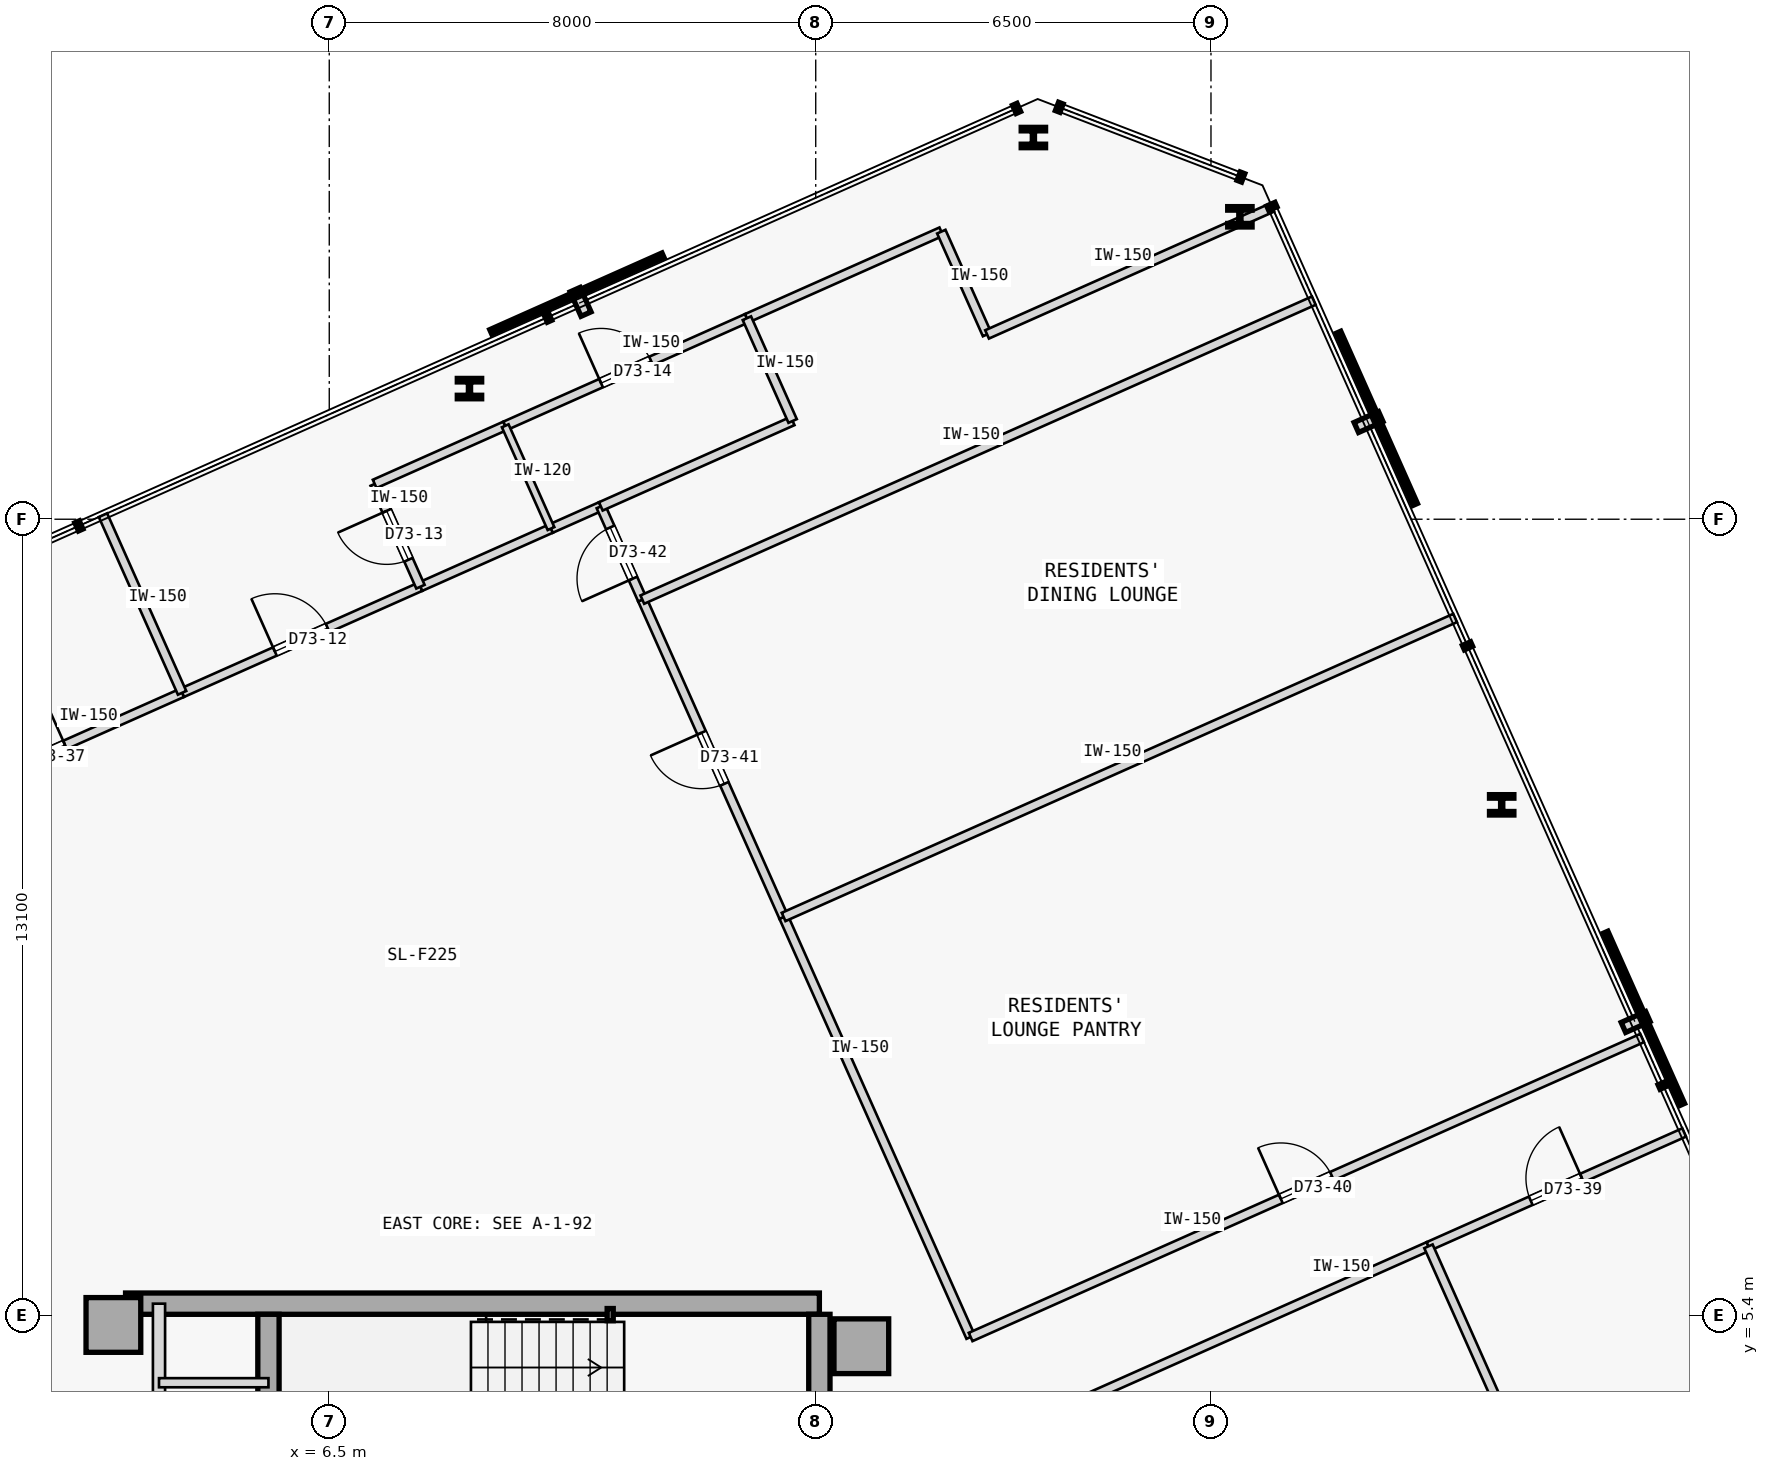
"""IFC4 building model, lengths in metres.
Left out: names, types, materials, properties, quantities, classifications, styles, units other than length and angle.
Written with IfcOpenShell. Run it as: python <this file> out.ifc"""

import sys

from ifc_helpers import new_model, si_unit, direction, frame, frame_2d, origin, origin_2d, place, context, subcontext, project, spatial, rectangle, hollow_rectangle, i_section, extrude, element, fill, save


model = new_model("IFC4")
c1 = context("Model", 3, precision=1e-05, world=origin(), true_north=direction((0.0, 1.0)))
c2 = subcontext(c1, "Body", "Model", "MODEL_VIEW")
j1 = project(units=[si_unit("LENGTHUNIT", "METRE"), si_unit("PLANEANGLEUNIT", "RADIAN")], contexts=[c1])
p1 = place(None, origin())
s1 = spatial("IfcSite", under=j1, at=p1, CompositionType="ELEMENT")
p2 = place(p1, origin())
s2 = spatial("IfcBuilding", under=s1, at=p2, CompositionType="ELEMENT")
p3 = place(p2, frame((0.0, 0.0, 272.25)))
s3 = spatial("IfcBuildingStorey", under=s2, at=p3, CompositionType="ELEMENT", Elevation=272.25)
for number, where, z_axis, x_axis in (
    (1, (15.25, 4.9, 0.0), (0.0, 0.0, 1.0), (1.0, 0.0, 0.0)),
    (2, (2.95, 5.25, 0.0), (0.0, 0.0, 1.0), (1.0, 0.0, 0.0)),
):
    element("IfcColumn", number, at=place(p3, frame(where, z_axis=z_axis, x_axis=x_axis)), inside=s3, PredefinedType="COLUMN", context=c2, shape_type="SweptSolid", body=[
        extrude(rectangle(XDim=0.9, YDim=0.9, at=origin_2d()), origin(), (0.0, 0.0, 1.0), 3.35),
    ])
p4 = place(p3, frame((3.15, 5.6, 0.0), z_axis=(0.0, 0.0, 1.0), x_axis=(1.0, 0.0, 0.0)))
e3 = element("IfcWall", 3, at=p4, inside=s3, PredefinedType="SHEAR", context=c2, shape_type="SweptSolid", body=[
    extrude(rectangle(XDim=11.41, YDim=0.35, at=frame_2d((5.705, 0.0))), origin(), (0.0, 0.0, 1.0), 3.1),
])
p5 = place(p3, frame((14.56, -5.425, 0.0), z_axis=(0.0, 0.0, 1.0), x_axis=(0.0, 1.0, 0.0)))
e4 = element("IfcWall", 4, at=p5, inside=s3, PredefinedType="SHEAR", context=c2, shape_type="SweptSolid", body=[
    extrude(rectangle(XDim=10.85, YDim=0.35, at=frame_2d((5.425, 0.0))), origin(), (0.0, 0.0, 1.0), 3.1),
])
p6 = place(p3, frame((5.5, 2.15, 0.0), z_axis=(0.0, 0.0, 1.0), x_axis=(0.0, 1.0, 0.0)))
e5 = element("IfcWall", 5, at=p6, inside=s3, PredefinedType="SHEAR", context=c2, shape_type="SweptSolid", body=[
    extrude(rectangle(XDim=3.275, YDim=0.35, at=frame_2d((1.638, 0.0))), origin(), (0.0, 0.0, 1.0), 3.1),
])
p7 = place(p3, frame((11.12, 5.42, 0.0), z_axis=(0.0, 0.0, 1.0), x_axis=(1.0, 0.0, 0.0)))
e6 = element("IfcColumn", 6, at=p7, inside=s3, PredefinedType="COLUMN", context=c2, shape_type="SweptSolid", body=[
    extrude(hollow_rectangle(XDim=0.1, YDim=0.2, WallThickness=0.008, at=origin_2d()), origin(), (0.0, 0.0, 1.0), 3.35),
])
for number, where, z_axis, x_axis in (
    (7, (25.781, 13.803, 0.0), (0.0, 0.0, 1.0), (1.0, 0.0, 0.0)),
    (8, (21.476, 23.473, 0.0), (0.0, 0.0, 1.0), (1.0, 0.0, 0.0)),
    (9, (18.08, 24.777, 0.0), (0.0, 0.0, 1.0), (1.0, 0.0, 0.0)),
    (10, (8.806, 20.648, 0.0), (0.0, 0.0, 1.0), (1.0, 0.0, 0.0)),
):
    element("IfcColumn", number, at=place(p3, frame(where, z_axis=z_axis, x_axis=x_axis)), inside=s3, PredefinedType="COLUMN", context=c2, shape_type="SweptSolid", body=[
        extrude(i_section(OverallWidth=0.401, OverallDepth=0.335, WebThickness=0.036, FlangeThickness=0.058, FilletRadius=0.015, at=origin_2d()), origin(), (0.0, 0.0, 1.0), 3.35),
    ])
p8 = place(p3, frame((3.7, -1.15, 0.0), z_axis=(0.0, 0.0, 1.0), x_axis=(0.0, 1.0, 0.0)))
e11 = element("IfcWall", 11, at=p8, inside=s3, PredefinedType="STANDARD", context=c2, shape_type="SweptSolid", body=[
    extrude(rectangle(XDim=6.75, YDim=0.2, at=frame_2d((3.375, 0.0))), origin(), (0.0, 0.0, 1.0), 3.1),
])
p9 = place(p8, frame((1.1, 0.0, 0.0)))
e12 = element("IfcOpeningElement", 12, at=p9, cuts=e11, PredefinedType="OPENING", context=c2, shape_type="SweptSolid", body=[
    extrude(rectangle(XDim=0.9, YDim=2.15, at=frame_2d((0.45, 1.075))), frame((0.0, 0.11, 0.0), z_axis=(0.0, -1.0, 0.0), x_axis=(1.0, 0.0, 0.0)), (0.0, 0.0, 1.0), 0.22),
])
p10 = place(p8, frame((4.0, 0.0, 0.0)))
e13 = element("IfcOpeningElement", 13, at=p10, cuts=e11, PredefinedType="OPENING", context=c2, shape_type="SweptSolid", body=[
    extrude(rectangle(XDim=0.92, YDim=2.15, at=frame_2d((0.46, 1.075))), frame((0.0, 0.11, 0.0), z_axis=(0.0, -1.0, 0.0), x_axis=(1.0, 0.0, 0.0)), (0.0, 0.0, 1.0), 0.22),
])
p11 = place(p3, frame((3.7, 4.3, 0.0), z_axis=(0.0, 0.0, 1.0), x_axis=(1.0, 0.0, 0.0)))
e14 = element("IfcWall", 14, at=p11, inside=s3, PredefinedType="PARTITIONING", context=c2, shape_type="SweptSolid", body=[
    extrude(rectangle(XDim=1.8, YDim=0.15, at=frame_2d((0.9, 0.0))), origin(), (0.0, 0.0, 1.0), 3.1),
])
p12 = place(p3, frame((4.08, 15.645, 0.0), z_axis=(0.0, 0.0, 1.0), x_axis=(0.913557968328, 0.406708542452, 0.0)))
e15 = element("IfcWall", 15, at=p12, inside=s3, PredefinedType="PARTITIONING", context=c2, shape_type="SweptSolid", body=[
    extrude(rectangle(XDim=4.291, YDim=0.15, at=frame_2d((2.146, 0.0))), origin(), (0.0, 0.0, 1.0), 3.1),
])
p13 = place(p12, frame((1.67, 0.0, 0.0)))
e16 = element("IfcOpeningElement", 16, at=p13, cuts=e15, PredefinedType="OPENING", context=c2, shape_type="SweptSolid", body=[
    extrude(rectangle(XDim=0.95, YDim=2.15, at=frame_2d((0.475, 1.075))), frame((0.0, 0.085, 0.0), z_axis=(0.0, -1.0, 0.0), x_axis=(1.0, 0.0, 0.0)), (0.0, 0.0, 1.0), 0.17),
])
p14 = place(p3, frame((8.0, 17.39, 0.0), z_axis=(0.0, 0.0, 1.0), x_axis=(0.913520021435, 0.406793768926, 0.0)))
e17 = element("IfcWall", 17, at=p14, inside=s3, PredefinedType="PARTITIONING", context=c2, shape_type="SweptSolid", body=[
    extrude(rectangle(XDim=2.35, YDim=0.15, at=frame_2d((1.175, 0.0))), origin(), (0.0, 0.0, 1.0), 3.1),
])
p15 = place(p3, frame((10.146, 18.346, 0.0), z_axis=(0.0, 0.0, 1.0), x_axis=(0.9135644188, 0.406694052946, 0.0)))
e18 = element("IfcWall", 18, at=p15, inside=s3, PredefinedType="PARTITIONING", context=c2, shape_type="SweptSolid", body=[
    extrude(rectangle(XDim=0.897, YDim=0.15, at=frame_2d((0.448, 0.0))), origin(), (0.0, 0.0, 1.0), 3.1),
])
p16 = place(p3, frame((-0.612, 13.557, 0.0), z_axis=(0.0, 0.0, 1.0), x_axis=(0.913546679905, 0.406733897819, 0.0)))
e19 = element("IfcWall", 19, at=p16, inside=s3, PredefinedType="PARTITIONING", context=c2, shape_type="SweptSolid", body=[
    extrude(rectangle(XDim=5.135, YDim=0.15, at=frame_2d((2.567, 0.0))), origin(), (0.0, 0.0, 1.0), 3.1),
])
p17 = place(p16, frame((2.107, 0.0, 0.0)))
e20 = element("IfcOpeningElement", 20, at=p17, cuts=e19, PredefinedType="OPENING", context=c2, shape_type="SweptSolid", body=[
    extrude(rectangle(XDim=0.92, YDim=2.15, at=frame_2d((0.46, 1.075))), frame((0.0, 0.085, 0.0), z_axis=(0.0, -1.0, 0.0), x_axis=(1.0, 0.0, 0.0)), (0.0, 0.0, 1.0), 0.17),
])
p18 = place(p3, frame((17.739, 3.499, 0.0), z_axis=(0.0, 0.0, 1.0), x_axis=(0.913545033673, 0.406737595326, 0.0)))
e21 = element("IfcWall", 21, at=p18, inside=s3, PredefinedType="PARTITIONING", context=c2, shape_type="SweptSolid", body=[
    extrude(rectangle(XDim=7.485, YDim=0.15, at=frame_2d((3.743, 0.0))), origin(), (0.0, 0.0, 1.0), 3.1),
])
p19 = place(p3, frame((24.577, 6.543, 0.0), z_axis=(0.0, 0.0, 1.0), x_axis=(0.913537946403, 0.406753513177, 0.0)))
e22 = element("IfcWall", 22, at=p19, inside=s3, PredefinedType="PARTITIONING", context=c2, shape_type="SweptSolid", body=[
    extrude(rectangle(XDim=4.603, YDim=0.15, at=frame_2d((2.302, 0.0))), origin(), (0.0, 0.0, 1.0), 3.1),
])
p20 = place(p19, frame((1.842, 0.0, 0.0)))
e23 = element("IfcOpeningElement", 23, at=p20, cuts=e22, PredefinedType="OPENING", context=c2, shape_type="SweptSolid", body=[
    extrude(rectangle(XDim=0.92, YDim=2.15, at=frame_2d((0.46, 1.075))), frame((0.0, 0.085, 0.0), z_axis=(0.0, -1.0, 0.0), x_axis=(1.0, 0.0, 0.0)), (0.0, 0.0, 1.0), 0.17),
])
p21 = place(p3, frame((17.047, 5.052, 0.0), z_axis=(0.0, 0.0, 1.0), x_axis=(-0.406752543172, 0.913538378298, 0.0)))
e24 = element("IfcWall", 24, at=p21, inside=s3, PredefinedType="PARTITIONING", context=c2, shape_type="SweptSolid", body=[
    extrude(rectangle(XDim=7.561, YDim=0.15, at=frame_2d((3.781, 0.0))), origin(), (0.0, 0.0, 1.0), 3.1),
])
p22 = place(p3, frame((17.047, 5.052, 0.0), z_axis=(0.0, 0.0, 1.0), x_axis=(0.913549839503, 0.406726801113, 0.0)))
e25 = element("IfcWall", 25, at=p22, inside=s3, PredefinedType="PARTITIONING", context=c2, shape_type="SweptSolid", body=[
    extrude(rectangle(XDim=12.088, YDim=0.15, at=frame_2d((6.044, 0.0))), origin(), (0.0, 0.0, 1.0), 3.1),
])
p23 = place(p22, frame((5.584, 0.0, 0.0)))
e26 = element("IfcOpeningElement", 26, at=p23, cuts=e25, PredefinedType="OPENING", context=c2, shape_type="SweptSolid", body=[
    extrude(rectangle(XDim=0.92, YDim=2.15, at=frame_2d((0.46, 1.075))), frame((0.0, 0.085, 0.0), z_axis=(0.0, -1.0, 0.0), x_axis=(1.0, 0.0, 0.0)), (0.0, 0.0, 1.0), 0.17),
])
p24 = place(p3, frame((13.972, 11.959, 0.0), z_axis=(0.0, 0.0, 1.0), x_axis=(-0.406713331746, 0.913555836159, 0.0)))
e27 = element("IfcWall", 27, at=p24, inside=s3, PredefinedType="PARTITIONING", context=c2, shape_type="SweptSolid", body=[
    extrude(rectangle(XDim=5.713, YDim=0.15, at=frame_2d((2.856, 0.0))), origin(), (0.0, 0.0, 1.0), 3.1),
])
p25 = place(p24, frame((2.396, 0.0, 0.0)))
e28 = element("IfcOpeningElement", 28, at=p25, cuts=e27, PredefinedType="OPENING", context=c2, shape_type="SweptSolid", body=[
    extrude(rectangle(XDim=0.92, YDim=2.15, at=frame_2d((0.46, 1.075))), frame((0.0, 0.085, 0.0), z_axis=(0.0, -1.0, 0.0), x_axis=(1.0, 0.0, 0.0)), (0.0, 0.0, 1.0), 0.17),
])
p26 = place(p3, frame((11.648, 17.178, 0.0), z_axis=(0.0, 0.0, 1.0), x_axis=(-0.406786313485, 0.913523341334, 0.0)))
e29 = element("IfcWall", 29, at=p26, inside=s3, PredefinedType="PARTITIONING", context=c2, shape_type="SweptSolid", body=[
    extrude(rectangle(XDim=1.678, YDim=0.15, at=frame_2d((0.839, 0.0))), origin(), (0.0, 0.0, 1.0), 3.1),
])
p27 = place(p26, frame((0.379, 0.0, 0.0)))
e30 = element("IfcOpeningElement", 30, at=p27, cuts=e29, PredefinedType="OPENING", context=c2, shape_type="SweptSolid", body=[
    extrude(rectangle(XDim=0.92, YDim=2.15, at=frame_2d((0.46, 1.075))), frame((0.0, 0.085, 0.0), z_axis=(0.0, -1.0, 0.0), x_axis=(1.0, 0.0, 0.0)), (0.0, 0.0, 1.0), 0.17),
])
p28 = place(p3, frame((8.0, 17.39, 0.0), z_axis=(0.0, 0.0, 1.0), x_axis=(-0.406701600856, 0.913561058639, 0.0)))
e31 = element("IfcWall", 31, at=p28, inside=s3, PredefinedType="PARTITIONING", context=c2, shape_type="SweptSolid", body=[
    extrude(rectangle(XDim=1.85, YDim=0.15, at=frame_2d((0.925, 0.0))), origin(), (0.0, 0.0, 1.0), 3.1),
])
p29 = place(p28, frame((0.485, 0.0, 0.0)))
e32 = element("IfcOpeningElement", 32, at=p29, cuts=e31, PredefinedType="OPENING", context=c2, shape_type="SweptSolid", body=[
    extrude(rectangle(XDim=0.88, YDim=2.15, at=frame_2d((0.44, 1.075))), frame((0.0, 0.085, 0.0), z_axis=(0.0, -1.0, 0.0), x_axis=(1.0, 0.0, 0.0)), (0.0, 0.0, 1.0), 0.17),
])
p30 = place(p3, frame((7.247, 19.081, 0.0), z_axis=(0.0, 0.0, 1.0), x_axis=(0.913541436194, 0.406745675276, 0.0)))
e33 = element("IfcWall", 33, at=p30, inside=s3, PredefinedType="PARTITIONING", context=c2, shape_type="SweptSolid", body=[
    extrude(rectangle(XDim=2.35, YDim=0.15, at=frame_2d((1.175, 0.0))), origin(), (0.0, 0.0, 1.0), 3.1),
])
p31 = place(p3, frame((9.394, 20.036, 0.0), z_axis=(0.0, 0.0, 1.0), x_axis=(0.913554477336, 0.406716383908, 0.0)))
e34 = element("IfcWall", 34, at=p31, inside=s3, PredefinedType="PARTITIONING", context=c2, shape_type="SweptSolid", body=[
    extrude(rectangle(XDim=4.35, YDim=0.15, at=frame_2d((2.175, 0.0))), origin(), (0.0, 0.0, 1.0), 3.1),
])
p32 = place(p31, frame((1.725, 0.0, 0.0)))
e35 = element("IfcOpeningElement", 35, at=p32, cuts=e34, PredefinedType="OPENING", context=c2, shape_type="SweptSolid", body=[
    extrude(rectangle(XDim=0.9, YDim=2.15, at=frame_2d((0.45, 1.075))), frame((0.0, 0.085, 0.0), z_axis=(0.0, -1.0, 0.0), x_axis=(1.0, 0.0, 0.0)), (0.0, 0.0, 1.0), 0.17),
])
p33 = place(p3, frame((4.08, 15.645, 0.0), z_axis=(0.0, 0.0, 1.0), x_axis=(-0.406761717745, 0.913534293268, 0.0)))
e36 = element("IfcWall", 36, at=p33, inside=s3, PredefinedType="PARTITIONING", context=c2, shape_type="SweptSolid", body=[
    extrude(rectangle(XDim=3.198, YDim=0.15, at=frame_2d((1.599, 0.0))), origin(), (0.0, 0.0, 1.0), 3.1),
])
p34 = place(p3, frame((13.368, 21.806, 0.0), z_axis=(0.0, 0.0, 1.0), x_axis=(0.913538066796, 0.406753242783, 0.0)))
e37 = element("IfcWall", 37, at=p34, inside=s3, PredefinedType="PARTITIONING", context=c2, shape_type="SweptSolid", body=[
    extrude(rectangle(XDim=3.5, YDim=0.15, at=frame_2d((1.75, 0.0))), origin(), (0.0, 0.0, 1.0), 3.1),
])
p35 = place(p3, frame((17.318, 21.539, 0.0), z_axis=(0.0, 0.0, 1.0), x_axis=(-0.406750635596, 0.913539227643, 0.0)))
e38 = element("IfcWall", 38, at=p35, inside=s3, PredefinedType="PARTITIONING", context=c2, shape_type="SweptSolid", body=[
    extrude(rectangle(XDim=1.85, YDim=0.15, at=frame_2d((0.925, 0.0))), origin(), (0.0, 0.0, 1.0), 3.1),
])
p36 = place(p3, frame((17.318, 21.539, 0.0), z_axis=(0.0, 0.0, 1.0), x_axis=(0.91356434511, 0.406694218479, 0.0)))
e39 = element("IfcWall", 39, at=p36, inside=s3, PredefinedType="PARTITIONING", context=c2, shape_type="SweptSolid", body=[
    extrude(rectangle(XDim=5.135, YDim=0.15, at=frame_2d((2.567, 0.0))), origin(), (0.0, 0.0, 1.0), 3.1),
])
p37 = place(p3, frame((10.146, 18.346, 0.0), z_axis=(0.0, 0.0, 1.0), x_axis=(-0.406860767979, 0.913490183571, 0.0)))
e40 = element("IfcWall", 40, at=p37, inside=s3, PredefinedType="PARTITIONING", context=c2, shape_type="SweptSolid", body=[
    extrude(rectangle(XDim=1.85, YDim=0.12, at=frame_2d((0.925, 0.0))), origin(), (0.0, 0.0, 1.0), 3.1),
])
p38 = place(p3, frame((10.966, 18.711, 0.0), z_axis=(0.0, 0.0, 1.0), x_axis=(0.913540199258, 0.406748453396, 0.0)))
e41 = element("IfcWall", 41, at=p38, inside=s3, PredefinedType="PARTITIONING", context=c2, shape_type="SweptSolid", body=[
    extrude(rectangle(XDim=3.453, YDim=0.15, at=frame_2d((1.727, 0.0))), origin(), (0.0, 0.0, 1.0), 3.1),
])
p39 = place(p3, frame((14.12, 20.116, 0.0), z_axis=(0.0, 0.0, 1.0), x_axis=(-0.406750635596, 0.913539227643, 0.0)))
e42 = element("IfcWall", 42, at=p39, inside=s3, PredefinedType="PARTITIONING", context=c2, shape_type="SweptSolid", body=[
    extrude(rectangle(XDim=1.85, YDim=0.15, at=frame_2d((0.925, 0.0))), origin(), (0.0, 0.0, 1.0), 3.1),
])
p40 = place(p3, frame((28.081, -1.327, 0.0), z_axis=(0.0, 0.0, 1.0), x_axis=(-0.406751025101, 0.913539054217, 0.0)))
e43 = element("IfcWall", 43, at=p40, inside=s3, PredefinedType="PARTITIONING", context=c2, shape_type="SweptSolid", body=[
    extrude(rectangle(XDim=8.615, YDim=0.15, at=frame_2d((4.308, 0.0))), origin(), (0.0, 0.0, 1.0), 3.1),
])
p41 = place(p3, frame((13.972, 11.959, 0.0), z_axis=(0.0, 0.0, 1.0), x_axis=(0.913549839503, 0.406726801113, 0.0)))
e44 = element("IfcWall", 44, at=p41, inside=s3, PredefinedType="PARTITIONING", context=c2, shape_type="SweptSolid", body=[
    extrude(rectangle(XDim=12.088, YDim=0.15, at=frame_2d((6.044, 0.0))), origin(), (0.0, 0.0, 1.0), 3.1),
])
p42 = place(p3, frame((11.648, 17.178, 0.0), z_axis=(0.0, 0.0, 1.0), x_axis=(0.913542334914, 0.406743656766, 0.0)))
e45 = element("IfcWall", 45, at=p42, inside=s3, PredefinedType="PARTITIONING", context=c2, shape_type="SweptSolid", body=[
    extrude(rectangle(XDim=12.088, YDim=0.15, at=frame_2d((6.044, 0.0))), origin(), (0.0, 0.0, 1.0), 3.1),
])
p43 = place(p13, origin())
e46 = element("IfcDoor", 46, at=p43, inside=s3, OperationType="SINGLE_SWING_LEFT", PredefinedType="DOOR", context=c2, shape_type="SweptSolid", body=[
    extrude(rectangle(XDim=0.95, YDim=2.15, at=frame_2d((0.475, 1.075))), frame((0.0, 0.025, 0.0), z_axis=(0.0, -1.0, 0.0), x_axis=(1.0, 0.0, 0.0)), (0.0, 0.0, 1.0), 0.05),
])
fill(e16, e46)
p44 = place(p29, origin())
e47 = element("IfcDoor", 47, at=p44, inside=s3, OperationType="SINGLE_SWING_RIGHT", PredefinedType="DOOR", context=c2, shape_type="SweptSolid", body=[
    extrude(rectangle(XDim=0.88, YDim=2.15, at=frame_2d((0.44, 1.075))), frame((0.0, 0.025, 0.0), z_axis=(0.0, -1.0, 0.0), x_axis=(1.0, 0.0, 0.0)), (0.0, 0.0, 1.0), 0.05),
])
fill(e32, e47)
p45 = place(p32, origin())
e48 = element("IfcDoor", 48, at=p45, inside=s3, OperationType="SINGLE_SWING_LEFT", PredefinedType="DOOR", context=c2, shape_type="SweptSolid", body=[
    extrude(rectangle(XDim=0.9, YDim=2.15, at=frame_2d((0.45, 1.075))), frame((0.0, 0.025, 0.0), z_axis=(0.0, -1.0, 0.0), x_axis=(1.0, 0.0, 0.0)), (0.0, 0.0, 1.0), 0.05),
])
fill(e35, e48)
p46 = place(p17, origin())
e49 = element("IfcDoor", 49, at=p46, inside=s3, OperationType="SINGLE_SWING_RIGHT", PredefinedType="DOOR", context=c2, shape_type="SweptSolid", body=[
    extrude(rectangle(XDim=0.92, YDim=2.15, at=frame_2d((0.46, 1.075))), frame((0.0, 0.025, 0.0), z_axis=(0.0, -1.0, 0.0), x_axis=(1.0, 0.0, 0.0)), (0.0, 0.0, 1.0), 0.05),
])
fill(e20, e49)
p47 = place(p20, origin())
e50 = element("IfcDoor", 50, at=p47, inside=s3, OperationType="SINGLE_SWING_RIGHT", PredefinedType="DOOR", context=c2, shape_type="SweptSolid", body=[
    extrude(rectangle(XDim=0.92, YDim=2.15, at=frame_2d((0.46, 1.075))), frame((0.0, 0.025, 0.0), z_axis=(0.0, -1.0, 0.0), x_axis=(1.0, 0.0, 0.0)), (0.0, 0.0, 1.0), 0.05),
])
fill(e23, e50)
p48 = place(p23, origin())
e51 = element("IfcDoor", 51, at=p48, inside=s3, OperationType="SINGLE_SWING_LEFT", PredefinedType="DOOR", context=c2, shape_type="SweptSolid", body=[
    extrude(rectangle(XDim=0.92, YDim=2.15, at=frame_2d((0.46, 1.075))), frame((0.0, 0.025, 0.0), z_axis=(0.0, -1.0, 0.0), x_axis=(1.0, 0.0, 0.0)), (0.0, 0.0, 1.0), 0.05),
])
fill(e26, e51)
p49 = place(p25, origin())
e52 = element("IfcDoor", 52, at=p49, inside=s3, OperationType="SINGLE_SWING_RIGHT", PredefinedType="DOOR", context=c2, shape_type="SweptSolid", body=[
    extrude(rectangle(XDim=0.92, YDim=2.15, at=frame_2d((0.46, 1.075))), frame((0.0, 0.025, 0.0), z_axis=(0.0, -1.0, 0.0), x_axis=(1.0, 0.0, 0.0)), (0.0, 0.0, 1.0), 0.05),
])
fill(e28, e52)
p50 = place(p27, origin())
e53 = element("IfcDoor", 53, at=p50, inside=s3, OperationType="SINGLE_SWING_LEFT", PredefinedType="DOOR", context=c2, shape_type="SweptSolid", body=[
    extrude(rectangle(XDim=0.92, YDim=2.15, at=frame_2d((0.46, 1.075))), frame((0.0, 0.025, 0.0), z_axis=(0.0, -1.0, 0.0), x_axis=(1.0, 0.0, 0.0)), (0.0, 0.0, 1.0), 0.05),
])
fill(e30, e53)
save(model, sys.argv[1])
